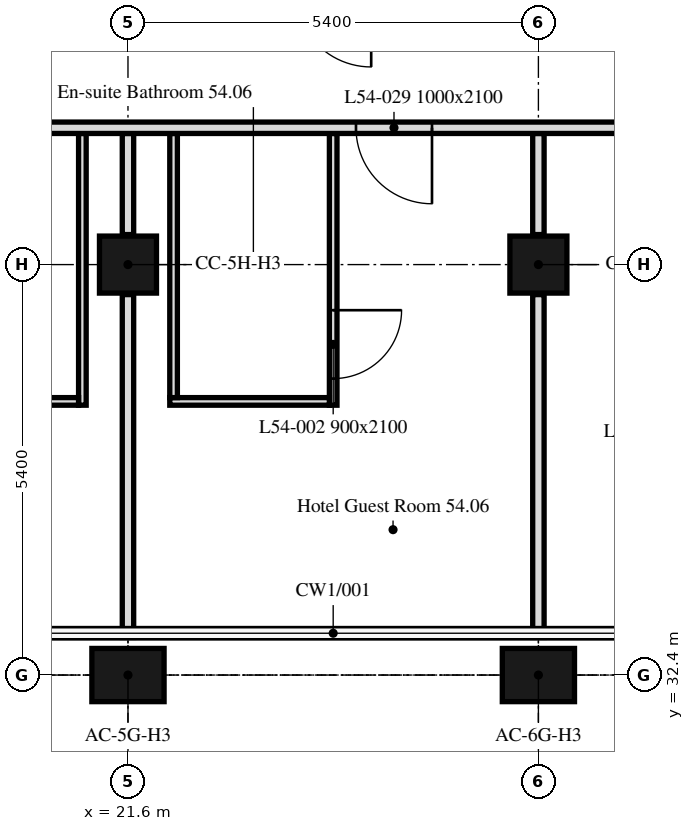
"""IFC4 building model, lengths in metres.
Left out: names, types, materials, properties, quantities, classifications, styles, units other than length and angle.
Written with IfcOpenShell. Run it as: python <this file> out.ifc"""

import sys

from ifc_helpers import new_model, si_unit, direction, frame, frame_2d, origin, origin_2d, place, context, subcontext, project, spatial, rectangle, extrude, element, fill, save


model = new_model("IFC4")
c1 = context("Model", 3, precision=1e-05, world=origin(), true_north=direction((0.0, 1.0)))
c2 = subcontext(c1, "Body", "Model", "MODEL_VIEW")
j1 = project(units=[si_unit("LENGTHUNIT", "METRE"), si_unit("PLANEANGLEUNIT", "RADIAN")], contexts=[c1])
p1 = place(None, origin())
s1 = spatial("IfcSite", under=j1, at=p1, CompositionType="ELEMENT")
p2 = place(p1, origin())
s2 = spatial("IfcBuilding", under=s1, at=p2, CompositionType="ELEMENT")
p3 = place(p2, frame((0.0, 0.0, 217.0)))
s3 = spatial("IfcBuildingStorey", under=s2, at=p3, CompositionType="ELEMENT", Elevation=217.0)
for number, where, z_axis, x_axis in (
    (1, (21.6, 32.4, 0.0), (0.0, 0.0, 1.0), (1.0, 0.0, 0.0)),
    (2, (27.0, 32.4, 0.0), (0.0, 0.0, 1.0), (1.0, 0.0, 0.0)),
):
    element("IfcColumn", number, at=place(p3, frame(where, z_axis=z_axis, x_axis=x_axis)), inside=s3, PredefinedType="COLUMN", context=c2, shape_type="SweptSolid", body=[
        extrude(rectangle(XDim=0.95, YDim=0.7, at=origin_2d()), origin(), (0.0, 0.0, 1.0), 3.0),
    ])
for number, where, z_axis, x_axis in (
    (3, (21.6, 37.8, 0.0), (0.0, 0.0, 1.0), (1.0, 0.0, 0.0)),
    (4, (27.0, 37.8, 0.0), (0.0, 0.0, 1.0), (1.0, 0.0, 0.0)),
):
    element("IfcColumn", number, at=place(p3, frame(where, z_axis=z_axis, x_axis=x_axis)), inside=s3, PredefinedType="COLUMN", context=c2, shape_type="SweptSolid", body=[
        extrude(rectangle(XDim=0.75, YDim=0.75, at=origin_2d()), origin(), (0.0, 0.0, 1.0), 3.0),
    ])
p4 = place(p3, frame((27.0, 39.525, 0.0), z_axis=(0.0, 0.0, 1.0), x_axis=(0.0, -1.0, 0.0)))
e5 = element("IfcWall", 5, at=p4, inside=s3, PredefinedType="PARTITIONING", context=c2, shape_type="SweptSolid", body=[
    extrude(rectangle(XDim=1.33, YDim=0.15, at=frame_2d((0.665, 0.0))), origin(), (0.0, 0.0, 1.0), 2.4),
])
p5 = place(p3, frame((27.0, 37.405, 0.0), z_axis=(0.0, 0.0, 1.0), x_axis=(0.0, -1.0, 0.0)))
e6 = element("IfcWall", 6, at=p5, inside=s3, PredefinedType="PARTITIONING", context=c2, shape_type="SweptSolid", body=[
    extrude(rectangle(XDim=4.51, YDim=0.15, at=frame_2d((2.255, 0.0))), origin(), (0.0, 0.0, 1.0), 2.4),
])
p6 = place(p3, frame((24.3, 39.525, 0.0), z_axis=(0.0, 0.0, 1.0), x_axis=(0.0, -1.0, 0.0)))
e7 = element("IfcWall", 7, at=p6, inside=s3, PredefinedType="PARTITIONING", context=c2, shape_type="SweptSolid", body=[
    extrude(rectangle(XDim=3.575, YDim=0.1, at=frame_2d((1.788, 0.0))), origin(), (0.0, 0.0, 1.0), 3.0),
])
p7 = place(p6, frame((2.325, 0.0, 0.0)))
e8 = element("IfcOpeningElement", 8, at=p7, cuts=e7, PredefinedType="OPENING", context=c2, shape_type="SweptSolid", body=[
    extrude(rectangle(XDim=0.9, YDim=2.1, at=frame_2d((0.45, 1.05))), frame((0.0, 0.05, 0.0), z_axis=(0.0, -1.0, 0.0), x_axis=(1.0, 0.0, 0.0)), (0.0, 0.0, 1.0), 0.1),
])
p8 = place(p3, frame((24.25, 36.0, 0.0), z_axis=(0.0, 0.0, 1.0), x_axis=(-1.0, 0.0, 0.0)))
e9 = element("IfcWall", 9, at=p8, inside=s3, PredefinedType="PARTITIONING", context=c2, shape_type="SweptSolid", body=[
    extrude(rectangle(XDim=2.1, YDim=0.1, at=frame_2d((1.05, 0.0))), origin(), (0.0, 0.0, 1.0), 3.0),
])
p9 = place(p3, frame((22.2, 36.05, 0.0), z_axis=(0.0, 0.0, 1.0), x_axis=(0.0, 1.0, 0.0)))
e10 = element("IfcWall", 10, at=p9, inside=s3, PredefinedType="PARTITIONING", context=c2, shape_type="SweptSolid", body=[
    extrude(rectangle(XDim=3.475, YDim=0.1, at=frame_2d((1.737, 0.0))), origin(), (0.0, 0.0, 1.0), 3.0),
])
p10 = place(p3, frame((21.6, 39.525, 0.0), z_axis=(0.0, 0.0, 1.0), x_axis=(0.0, -1.0, 0.0)))
e11 = element("IfcWall", 11, at=p10, inside=s3, PredefinedType="PARTITIONING", context=c2, shape_type="SweptSolid", body=[
    extrude(rectangle(XDim=1.33, YDim=0.15, at=frame_2d((0.665, 0.0))), origin(), (0.0, 0.0, 1.0), 2.4),
])
p11 = place(p3, frame((21.6, 37.405, 0.0), z_axis=(0.0, 0.0, 1.0), x_axis=(0.0, -1.0, 0.0)))
e12 = element("IfcWall", 12, at=p11, inside=s3, PredefinedType="PARTITIONING", context=c2, shape_type="SweptSolid", body=[
    extrude(rectangle(XDim=4.51, YDim=0.15, at=frame_2d((2.255, 0.0))), origin(), (0.0, 0.0, 1.0), 2.4),
])
p12 = place(p3, frame((21.0, 39.525, 0.0), z_axis=(0.0, 0.0, 1.0), x_axis=(0.0, -1.0, 0.0)))
e13 = element("IfcWall", 13, at=p12, inside=s3, PredefinedType="PARTITIONING", context=c2, shape_type="SweptSolid", body=[
    extrude(rectangle(XDim=3.575, YDim=0.1, at=frame_2d((1.788, 0.0))), origin(), (0.0, 0.0, 1.0), 3.0),
])
p13 = place(p3, frame((20.95, 36.0, 0.0), z_axis=(0.0, 0.0, 1.0), x_axis=(-1.0, 0.0, 0.0)))
e14 = element("IfcWall", 14, at=p13, inside=s3, PredefinedType="PARTITIONING", context=c2, shape_type="SweptSolid", body=[
    extrude(rectangle(XDim=2.1, YDim=0.1, at=frame_2d((1.05, 0.0))), origin(), (0.0, 0.0, 1.0), 3.0),
])
p14 = place(p3, frame((41.374, 39.6, 0.0), z_axis=(0.0, 0.0, 1.0), x_axis=(-1.0, 0.0, 0.0)))
e15 = element("IfcWall", 15, at=p14, inside=s3, PredefinedType="PARTITIONING", context=c2, shape_type="SweptSolid", body=[
    extrude(rectangle(XDim=35.899, YDim=0.15, at=frame_2d((17.949, 0.0))), origin(), (0.0, 0.0, 1.0), 2.4),
])
p15 = place(p14, frame((0.25, 0.0, 0.0)))
e16 = element("IfcOpeningElement", 16, at=p15, cuts=e15, PredefinedType="OPENING", context=c2, shape_type="SweptSolid", body=[
    extrude(rectangle(XDim=1.0, YDim=2.1, at=frame_2d((0.5, 1.05))), frame((0.0, 0.075, 0.0), z_axis=(0.0, -1.0, 0.0), x_axis=(1.0, 0.0, 0.0)), (0.0, 0.0, 1.0), 0.15),
])
p16 = place(p14, frame((27.124, 0.0, 0.0)))
e17 = element("IfcOpeningElement", 17, at=p16, cuts=e15, PredefinedType="OPENING", context=c2, shape_type="SweptSolid", body=[
    extrude(rectangle(XDim=1.0, YDim=2.1, at=frame_2d((0.5, 1.05))), frame((0.0, 0.075, 0.0), z_axis=(0.0, -1.0, 0.0), x_axis=(1.0, 0.0, 0.0)), (0.0, 0.0, 1.0), 0.15),
])
p17 = place(p14, frame((6.024, 0.0, 0.0)))
e18 = element("IfcOpeningElement", 18, at=p17, cuts=e15, PredefinedType="OPENING", context=c2, shape_type="SweptSolid", body=[
    extrude(rectangle(XDim=1.0, YDim=2.1, at=frame_2d((0.5, 1.05))), frame((0.0, 0.075, 0.0), z_axis=(0.0, -1.0, 0.0), x_axis=(1.0, 0.0, 0.0)), (0.0, 0.0, 1.0), 0.15),
])
p18 = place(p14, frame((11.974, 0.0, 0.0)))
e19 = element("IfcOpeningElement", 19, at=p18, cuts=e15, PredefinedType="OPENING", context=c2, shape_type="SweptSolid", body=[
    extrude(rectangle(XDim=1.0, YDim=2.1, at=frame_2d((0.5, 1.05))), frame((0.0, 0.075, 0.0), z_axis=(0.0, -1.0, 0.0), x_axis=(1.0, 0.0, 0.0)), (0.0, 0.0, 1.0), 0.15),
])
p19 = place(p14, frame((15.774, 0.0, 0.0)))
e20 = element("IfcOpeningElement", 20, at=p19, cuts=e15, PredefinedType="OPENING", context=c2, shape_type="SweptSolid", body=[
    extrude(rectangle(XDim=1.0, YDim=2.1, at=frame_2d((0.5, 1.05))), frame((0.0, 0.075, 0.0), z_axis=(0.0, -1.0, 0.0), x_axis=(1.0, 0.0, 0.0)), (0.0, 0.0, 1.0), 0.15),
])
p20 = place(p14, frame((22.774, 0.0, 0.0)))
e21 = element("IfcOpeningElement", 21, at=p20, cuts=e15, PredefinedType="OPENING", context=c2, shape_type="SweptSolid", body=[
    extrude(rectangle(XDim=1.0, YDim=2.1, at=frame_2d((0.5, 1.05))), frame((0.0, 0.075, 0.0), z_axis=(0.0, -1.0, 0.0), x_axis=(1.0, 0.0, 0.0)), (0.0, 0.0, 1.0), 0.15),
])
p21 = place(p14, frame((3.754, 0.0, 0.0)))
e22 = element("IfcOpeningElement", 22, at=p21, cuts=e15, PredefinedType="OPENING", context=c2, shape_type="SweptSolid", body=[
    extrude(rectangle(XDim=1.8, YDim=2.4, at=frame_2d((0.9, 1.2))), frame((0.0, 0.075, 0.0), z_axis=(0.0, -1.0, 0.0), x_axis=(1.0, 0.0, 0.0)), (0.0, 0.0, 1.0), 0.15),
])
p22 = place(p14, frame((29.124, 0.0, 0.0)))
e23 = element("IfcOpeningElement", 23, at=p22, cuts=e15, PredefinedType="OPENING", context=c2, shape_type="SweptSolid", body=[
    extrude(rectangle(XDim=1.0, YDim=2.1, at=frame_2d((0.5, 1.05))), frame((0.0, 0.075, 0.0), z_axis=(0.0, -1.0, 0.0), x_axis=(1.0, 0.0, 0.0)), (0.0, 0.0, 1.0), 0.15),
])
p23 = place(p7, origin())
e24 = element("IfcDoor", 24, at=p23, inside=s3, OperationType="SINGLE_SWING_RIGHT", PredefinedType="DOOR", context=c2, shape_type="SweptSolid", body=[
    extrude(rectangle(XDim=0.9, YDim=2.1, at=frame_2d((0.45, 1.05))), frame((0.0, 0.025, 0.0), z_axis=(0.0, -1.0, 0.0), x_axis=(1.0, 0.0, 0.0)), (0.0, 0.0, 1.0), 0.05),
])
fill(e8, e24)
p24 = place(p19, origin())
e25 = element("IfcDoor", 25, at=p24, inside=s3, OperationType="SINGLE_SWING_RIGHT", PredefinedType="DOOR", context=c2, shape_type="SweptSolid", body=[
    extrude(rectangle(XDim=1.0, YDim=2.1, at=frame_2d((0.5, 1.05))), frame((0.0, 0.025, 0.0), z_axis=(0.0, -1.0, 0.0), x_axis=(1.0, 0.0, 0.0)), (0.0, 0.0, 1.0), 0.05),
])
fill(e20, e25)
save(model, sys.argv[1])
